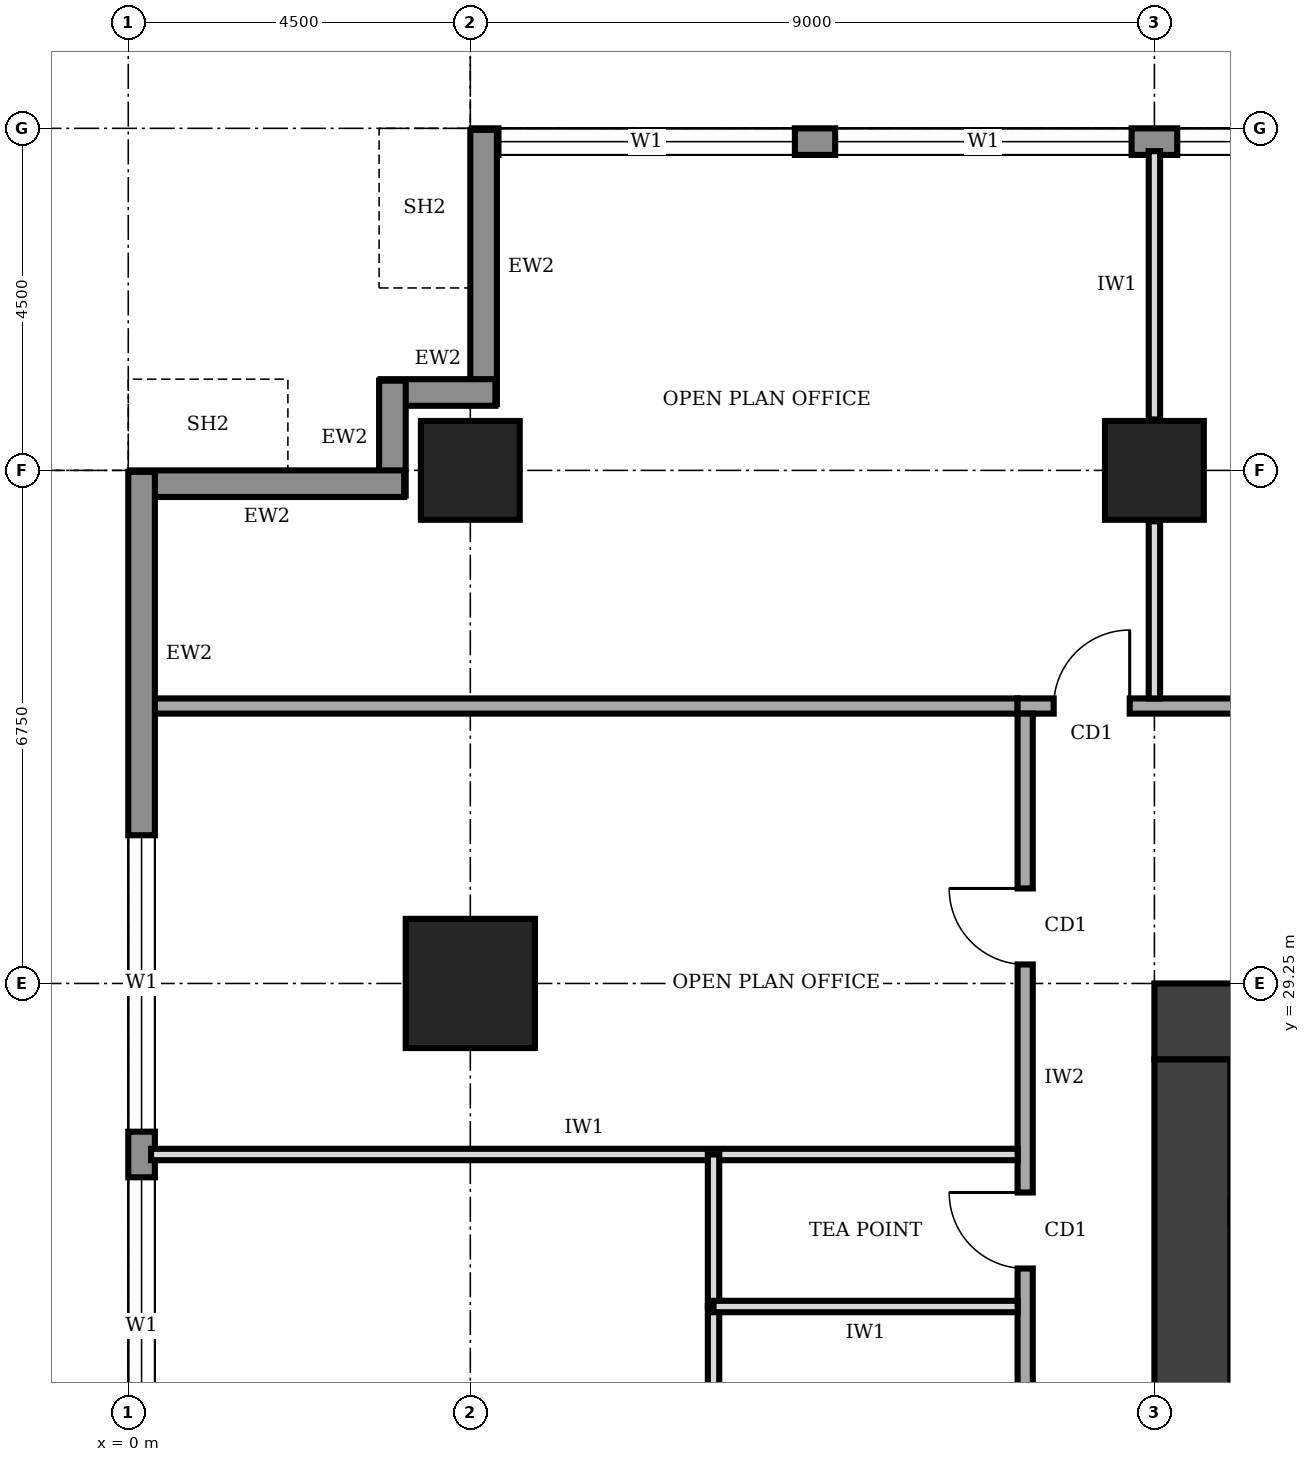
"""IFC4 building model, lengths in metres.
Left out: names, types, materials, properties, quantities, classifications, styles, units other than length and angle.
Written with IfcOpenShell. Run it as: python <this file> out.ifc"""

import sys

from ifc_helpers import new_model, si_unit, direction, frame, frame_2d, origin, origin_2d, place, context, subcontext, project, spatial, rectangle, extrude, element, fill, save


model = new_model("IFC4")
c1 = context("Model", 3, precision=1e-05, world=origin(), true_north=direction((0.0, 1.0)))
c2 = subcontext(c1, "Body", "Model", "MODEL_VIEW")
j1 = project(units=[si_unit("LENGTHUNIT", "METRE"), si_unit("PLANEANGLEUNIT", "RADIAN")], contexts=[c1])
p1 = place(None, origin())
s1 = spatial("IfcSite", under=j1, at=p1, CompositionType="ELEMENT")
p2 = place(p1, origin())
s2 = spatial("IfcBuilding", under=s1, at=p2, CompositionType="ELEMENT")
p3 = place(p2, frame((0.0, 0.0, 277.0)))
s3 = spatial("IfcBuildingStorey", under=s2, at=p3, CompositionType="ELEMENT", Elevation=277.0)
p4 = place(p3, frame((27.0, 28.75, 0.0), z_axis=(0.0, 0.0, 1.0), x_axis=(-1.0, 0.0, 0.0)))
e1 = element("IfcWall", 1, at=p4, inside=s3, PredefinedType="SHEAR", context=c2, shape_type="SweptSolid", body=[
    extrude(rectangle(XDim=13.5, YDim=1.0, at=frame_2d((6.75, 0.0))), origin(), (0.0, 0.0, 1.0), 4.0),
])
p5 = place(p4, frame((4.75, 0.0, 0.0)))
e2 = element("IfcOpeningElement", 2, at=p5, cuts=e1, PredefinedType="OPENING", context=c2, shape_type="SweptSolid", body=[
    extrude(rectangle(XDim=1.8, YDim=2.1, at=frame_2d((0.9, 1.05))), frame((0.0, 0.51, 0.0), z_axis=(0.0, -1.0, 0.0), x_axis=(1.0, 0.0, 0.0)), (0.0, 0.0, 1.0), 1.02),
])
p6 = place(p3, frame((14.0, 28.25, 0.0), z_axis=(0.0, 0.0, 1.0), x_axis=(0.0, -1.0, 0.0)))
e3 = element("IfcWall", 3, at=p6, inside=s3, PredefinedType="SHEAR", context=c2, shape_type="SweptSolid", body=[
    extrude(rectangle(XDim=16.0, YDim=1.0, at=frame_2d((8.0, 0.0))), origin(), (0.0, 0.0, 1.0), 4.0),
])
p7 = place(p3, frame((4.5, 29.25, 0.0), z_axis=(0.0, 0.0, 1.0), x_axis=(1.0, 0.0, 0.0)))
e4 = element("IfcColumn", 4, at=p7, inside=s3, PredefinedType="COLUMN", context=c2, shape_type="SweptSolid", body=[
    extrude(rectangle(XDim=1.7, YDim=1.7, at=origin_2d()), origin(), (0.0, 0.0, 1.0), 4.0),
])
for number, where, z_axis, x_axis in (
    (5, (4.5, 36.0, 0.0), (0.0, 0.0, 1.0), (1.0, 0.0, 0.0)),
    (6, (13.5, 36.0, 0.0), (0.0, 0.0, 1.0), (1.0, 0.0, 0.0)),
):
    element("IfcColumn", number, at=place(p3, frame(where, z_axis=z_axis, x_axis=x_axis)), inside=s3, PredefinedType="COLUMN", context=c2, shape_type="SweptSolid", body=[
        extrude(rectangle(XDim=1.3, YDim=1.3, at=origin_2d()), origin(), (0.0, 0.0, 1.0), 4.0),
    ])
p8 = place(p3, frame((35.98, 40.325, 0.0), z_axis=(0.0, 0.0, 1.0), x_axis=(-1.0, 0.0, 0.0)))
e7 = element("IfcWall", 7, at=p8, inside=s3, PredefinedType="STANDARD", context=c2, shape_type="SweptSolid", body=[
    extrude(rectangle(XDim=31.46, YDim=0.35, at=frame_2d((15.73, 0.0))), origin(), (0.0, 0.0, 1.0), 3.75),
])
p9 = place(p8, frame((27.21, 0.0, 0.9)))
e8 = element("IfcOpeningElement", 8, at=p9, cuts=e7, PredefinedType="OPENING", context=c2, shape_type="SweptSolid", body=[
    extrude(rectangle(XDim=3.9, YDim=2.2, at=frame_2d((1.95, 1.1))), frame((0.0, 0.185, 0.0), z_axis=(0.0, -1.0, 0.0), x_axis=(1.0, 0.0, 0.0)), (0.0, 0.0, 1.0), 0.37),
])
p10 = place(p8, frame((22.78, 0.0, 0.9)))
e9 = element("IfcOpeningElement", 9, at=p10, cuts=e7, PredefinedType="OPENING", context=c2, shape_type="SweptSolid", body=[
    extrude(rectangle(XDim=3.9, YDim=2.2, at=frame_2d((1.95, 1.1))), frame((0.0, 0.185, 0.0), z_axis=(0.0, -1.0, 0.0), x_axis=(1.0, 0.0, 0.0)), (0.0, 0.0, 1.0), 0.37),
])
p11 = place(p8, frame((18.28, 0.0, 0.9)))
e10 = element("IfcOpeningElement", 10, at=p11, cuts=e7, PredefinedType="OPENING", context=c2, shape_type="SweptSolid", body=[
    extrude(rectangle(XDim=3.9, YDim=2.2, at=frame_2d((1.95, 1.1))), frame((0.0, 0.185, 0.0), z_axis=(0.0, -1.0, 0.0), x_axis=(1.0, 0.0, 0.0)), (0.0, 0.0, 1.0), 0.37),
])
p12 = place(p8, frame((13.78, 0.0, 0.9)))
e11 = element("IfcOpeningElement", 11, at=p12, cuts=e7, PredefinedType="OPENING", context=c2, shape_type="SweptSolid", body=[
    extrude(rectangle(XDim=3.9, YDim=2.2, at=frame_2d((1.95, 1.1))), frame((0.0, 0.185, 0.0), z_axis=(0.0, -1.0, 0.0), x_axis=(1.0, 0.0, 0.0)), (0.0, 0.0, 1.0), 0.37),
])
p13 = place(p8, frame((9.28, 0.0, 0.9)))
e12 = element("IfcOpeningElement", 12, at=p13, cuts=e7, PredefinedType="OPENING", context=c2, shape_type="SweptSolid", body=[
    extrude(rectangle(XDim=3.9, YDim=2.2, at=frame_2d((1.95, 1.1))), frame((0.0, 0.185, 0.0), z_axis=(0.0, -1.0, 0.0), x_axis=(1.0, 0.0, 0.0)), (0.0, 0.0, 1.0), 0.37),
])
p14 = place(p8, frame((4.78, 0.0, 0.9)))
e13 = element("IfcOpeningElement", 13, at=p14, cuts=e7, PredefinedType="OPENING", context=c2, shape_type="SweptSolid", body=[
    extrude(rectangle(XDim=3.9, YDim=2.2, at=frame_2d((1.95, 1.1))), frame((0.0, 0.185, 0.0), z_axis=(0.0, -1.0, 0.0), x_axis=(1.0, 0.0, 0.0)), (0.0, 0.0, 1.0), 0.37),
])
p15 = place(p3, frame((4.675, 40.48, 0.0), z_axis=(0.0, 0.0, 1.0), x_axis=(0.0, -1.0, 0.0)))
e14 = element("IfcWall", 14, at=p15, inside=s3, PredefinedType="STANDARD", context=c2, shape_type="SweptSolid", body=[
    extrude(rectangle(XDim=3.61, YDim=0.35, at=frame_2d((1.805, 0.0))), origin(), (0.0, 0.0, 1.0), 2.85),
])
for number, where, z_axis, x_axis in (
    (15, (4.83, 37.025, 0.0), (0.0, 0.0, 1.0), (-1.0, 0.0, 0.0)),
    (16, (3.475, 37.18, 0.0), (0.0, 0.0, 1.0), (0.0, -1.0, 0.0)),
):
    element("IfcWall", number, at=place(p3, frame(where, z_axis=z_axis, x_axis=x_axis)), inside=s3, PredefinedType="STANDARD", context=c2, shape_type="SweptSolid", body=[
        extrude(rectangle(XDim=1.51, YDim=0.35, at=frame_2d((0.755, 0.0))), origin(), (0.0, 0.0, 1.0), 3.75),
    ])
p16 = place(p3, frame((3.63, 35.825, 0.0), z_axis=(0.0, 0.0, 1.0), x_axis=(-1.0, 0.0, 0.0)))
e17 = element("IfcWall", 17, at=p16, inside=s3, PredefinedType="STANDARD", context=c2, shape_type="SweptSolid", body=[
    extrude(rectangle(XDim=3.61, YDim=0.35, at=frame_2d((1.805, 0.0))), origin(), (0.0, 0.0, 1.0), 2.85),
])
p17 = place(p3, frame((0.175, 35.98, 0.0), z_axis=(0.0, 0.0, 1.0), x_axis=(0.0, -1.0, 0.0)))
e18 = element("IfcWall", 18, at=p17, inside=s3, PredefinedType="STANDARD", context=c2, shape_type="SweptSolid", body=[
    extrude(rectangle(XDim=31.46, YDim=0.35, at=frame_2d((15.73, 0.0))), origin(), (0.0, 0.0, 1.0), 3.75),
])
p18 = place(p17, frame((27.21, 0.0, 0.9)))
e19 = element("IfcOpeningElement", 19, at=p18, cuts=e18, PredefinedType="OPENING", context=c2, shape_type="SweptSolid", body=[
    extrude(rectangle(XDim=3.9, YDim=2.2, at=frame_2d((1.95, 1.1))), frame((0.0, 0.185, 0.0), z_axis=(0.0, -1.0, 0.0), x_axis=(1.0, 0.0, 0.0)), (0.0, 0.0, 1.0), 0.37),
])
p19 = place(p17, frame((22.78, 0.0, 0.9)))
e20 = element("IfcOpeningElement", 20, at=p19, cuts=e18, PredefinedType="OPENING", context=c2, shape_type="SweptSolid", body=[
    extrude(rectangle(XDim=3.9, YDim=2.2, at=frame_2d((1.95, 1.1))), frame((0.0, 0.185, 0.0), z_axis=(0.0, -1.0, 0.0), x_axis=(1.0, 0.0, 0.0)), (0.0, 0.0, 1.0), 0.37),
])
p20 = place(p17, frame((18.28, 0.0, 0.9)))
e21 = element("IfcOpeningElement", 21, at=p20, cuts=e18, PredefinedType="OPENING", context=c2, shape_type="SweptSolid", body=[
    extrude(rectangle(XDim=3.9, YDim=2.2, at=frame_2d((1.95, 1.1))), frame((0.0, 0.185, 0.0), z_axis=(0.0, -1.0, 0.0), x_axis=(1.0, 0.0, 0.0)), (0.0, 0.0, 1.0), 0.37),
])
p21 = place(p17, frame((13.78, 0.0, 0.9)))
e22 = element("IfcOpeningElement", 22, at=p21, cuts=e18, PredefinedType="OPENING", context=c2, shape_type="SweptSolid", body=[
    extrude(rectangle(XDim=3.9, YDim=2.2, at=frame_2d((1.95, 1.1))), frame((0.0, 0.185, 0.0), z_axis=(0.0, -1.0, 0.0), x_axis=(1.0, 0.0, 0.0)), (0.0, 0.0, 1.0), 0.37),
])
p22 = place(p17, frame((9.28, 0.0, 0.9)))
e23 = element("IfcOpeningElement", 23, at=p22, cuts=e18, PredefinedType="OPENING", context=c2, shape_type="SweptSolid", body=[
    extrude(rectangle(XDim=3.9, YDim=2.2, at=frame_2d((1.95, 1.1))), frame((0.0, 0.185, 0.0), z_axis=(0.0, -1.0, 0.0), x_axis=(1.0, 0.0, 0.0)), (0.0, 0.0, 1.0), 0.37),
])
p23 = place(p17, frame((4.78, 0.0, 0.9)))
e24 = element("IfcOpeningElement", 24, at=p23, cuts=e18, PredefinedType="OPENING", context=c2, shape_type="SweptSolid", body=[
    extrude(rectangle(XDim=3.9, YDim=2.2, at=frame_2d((1.95, 1.1))), frame((0.0, 0.185, 0.0), z_axis=(0.0, -1.0, 0.0), x_axis=(1.0, 0.0, 0.0)), (0.0, 0.0, 1.0), 0.37),
])
p24 = place(p3, frame((28.6, 32.9, 0.0), z_axis=(0.0, 0.0, 1.0), x_axis=(-1.0, 0.0, 0.0)))
e25 = element("IfcWall", 25, at=p24, inside=s3, PredefinedType="SOLIDWALL", context=c2, shape_type="SweptSolid", body=[
    extrude(rectangle(XDim=16.9, YDim=0.2, at=frame_2d((8.45, 0.0))), origin(), (0.0, 0.0, 1.0), 3.75),
])
p25 = place(p24, frame((15.425, 0.0, 0.0)))
e26 = element("IfcOpeningElement", 26, at=p25, cuts=e25, PredefinedType="OPENING", context=c2, shape_type="SweptSolid", body=[
    extrude(rectangle(XDim=1.0, YDim=2.1, at=frame_2d((0.5, 1.05))), frame((0.0, 0.11, 0.0), z_axis=(0.0, -1.0, 0.0), x_axis=(1.0, 0.0, 0.0)), (0.0, 0.0, 1.0), 0.22),
])
p26 = place(p24, frame((7.45, 0.0, 0.0)))
e27 = element("IfcOpeningElement", 27, at=p26, cuts=e25, PredefinedType="OPENING", context=c2, shape_type="SweptSolid", body=[
    extrude(rectangle(XDim=1.8, YDim=2.1, at=frame_2d((0.9, 1.05))), frame((0.0, 0.11, 0.0), z_axis=(0.0, -1.0, 0.0), x_axis=(1.0, 0.0, 0.0)), (0.0, 0.0, 1.0), 0.22),
])
p27 = place(p24, frame((0.275, 0.0, 0.0)))
e28 = element("IfcOpeningElement", 28, at=p27, cuts=e25, PredefinedType="OPENING", context=c2, shape_type="SweptSolid", body=[
    extrude(rectangle(XDim=1.0, YDim=2.1, at=frame_2d((0.5, 1.05))), frame((0.0, 0.11, 0.0), z_axis=(0.0, -1.0, 0.0), x_axis=(1.0, 0.0, 0.0)), (0.0, 0.0, 1.0), 0.22),
])
p28 = place(p3, frame((11.8, 32.8, 0.0), z_axis=(0.0, 0.0, 1.0), x_axis=(0.0, -1.0, 0.0)))
e29 = element("IfcWall", 29, at=p28, inside=s3, PredefinedType="SOLIDWALL", context=c2, shape_type="SweptSolid", body=[
    extrude(rectangle(XDim=23.8, YDim=0.2, at=frame_2d((11.9, 0.0))), origin(), (0.0, 0.0, 1.0), 3.75),
])
p29 = place(p28, frame((21.05, 0.0, 0.0)))
e30 = element("IfcOpeningElement", 30, at=p29, cuts=e29, PredefinedType="OPENING", context=c2, shape_type="SweptSolid", body=[
    extrude(rectangle(XDim=1.0, YDim=2.1, at=frame_2d((0.5, 1.05))), frame((0.0, 0.11, 0.0), z_axis=(0.0, -1.0, 0.0), x_axis=(1.0, 0.0, 0.0)), (0.0, 0.0, 1.0), 0.22),
])
p30 = place(p28, frame((17.65, 0.0, 0.0)))
e31 = element("IfcOpeningElement", 31, at=p30, cuts=e29, PredefinedType="OPENING", context=c2, shape_type="SweptSolid", body=[
    extrude(rectangle(XDim=0.9, YDim=2.1, at=frame_2d((0.45, 1.05))), frame((0.0, 0.11, 0.0), z_axis=(0.0, -1.0, 0.0), x_axis=(1.0, 0.0, 0.0)), (0.0, 0.0, 1.0), 0.22),
])
p31 = place(p28, frame((14.45, 0.0, 0.0)))
e32 = element("IfcOpeningElement", 32, at=p31, cuts=e29, PredefinedType="OPENING", context=c2, shape_type="SweptSolid", body=[
    extrude(rectangle(XDim=0.9, YDim=2.1, at=frame_2d((0.45, 1.05))), frame((0.0, 0.11, 0.0), z_axis=(0.0, -1.0, 0.0), x_axis=(1.0, 0.0, 0.0)), (0.0, 0.0, 1.0), 0.22),
])
p32 = place(p28, frame((8.9, 0.0, 0.0)))
e33 = element("IfcOpeningElement", 33, at=p32, cuts=e29, PredefinedType="OPENING", context=c2, shape_type="SweptSolid", body=[
    extrude(rectangle(XDim=0.9, YDim=2.1, at=frame_2d((0.45, 1.05))), frame((0.0, 0.11, 0.0), z_axis=(0.0, -1.0, 0.0), x_axis=(1.0, 0.0, 0.0)), (0.0, 0.0, 1.0), 0.22),
])
p33 = place(p28, frame((6.3, 0.0, 0.0)))
e34 = element("IfcOpeningElement", 34, at=p33, cuts=e29, PredefinedType="OPENING", context=c2, shape_type="SweptSolid", body=[
    extrude(rectangle(XDim=1.0, YDim=2.1, at=frame_2d((0.5, 1.05))), frame((0.0, 0.11, 0.0), z_axis=(0.0, -1.0, 0.0), x_axis=(1.0, 0.0, 0.0)), (0.0, 0.0, 1.0), 0.22),
])
p34 = place(p28, frame((11.4, 0.0, 0.0)))
e35 = element("IfcOpeningElement", 35, at=p34, cuts=e29, PredefinedType="OPENING", context=c2, shape_type="SweptSolid", body=[
    extrude(rectangle(XDim=1.0, YDim=2.1, at=frame_2d((0.5, 1.05))), frame((0.0, 0.11, 0.0), z_axis=(0.0, -1.0, 0.0), x_axis=(1.0, 0.0, 0.0)), (0.0, 0.0, 1.0), 0.22),
])
p35 = place(p28, frame((2.3, 0.0, 0.0)))
e36 = element("IfcOpeningElement", 36, at=p35, cuts=e29, PredefinedType="OPENING", context=c2, shape_type="SweptSolid", body=[
    extrude(rectangle(XDim=1.0, YDim=2.1, at=frame_2d((0.5, 1.05))), frame((0.0, 0.11, 0.0), z_axis=(0.0, -1.0, 0.0), x_axis=(1.0, 0.0, 0.0)), (0.0, 0.0, 1.0), 0.22),
])
p36 = place(p3, frame((0.3, 32.9, 0.0), z_axis=(0.0, 0.0, 1.0), x_axis=(1.0, 0.0, 0.0)))
e37 = element("IfcWall", 37, at=p36, inside=s3, PredefinedType="SOLIDWALL", context=c2, shape_type="SweptSolid", body=[
    extrude(rectangle(XDim=11.4, YDim=0.2, at=frame_2d((5.7, 0.0))), origin(), (0.0, 0.0, 1.0), 3.75),
])
p37 = place(p3, frame((13.5, 33.0, 0.0), z_axis=(0.0, 0.0, 1.0), x_axis=(0.0, 1.0, 0.0)))
e38 = element("IfcWall", 38, at=p37, inside=s3, PredefinedType="PARTITIONING", context=c2, shape_type="SweptSolid", body=[
    extrude(rectangle(XDim=2.33, YDim=0.15, at=frame_2d((1.165, 0.0))), origin(), (0.0, 0.0, 1.0), 2.85),
])
p38 = place(p3, frame((13.5, 36.67, 0.0), z_axis=(0.0, 0.0, 1.0), x_axis=(0.0, 1.0, 0.0)))
e39 = element("IfcWall", 39, at=p38, inside=s3, PredefinedType="PARTITIONING", context=c2, shape_type="SweptSolid", body=[
    extrude(rectangle(XDim=3.53, YDim=0.15, at=frame_2d((1.765, 0.0))), origin(), (0.0, 0.0, 1.0), 2.85),
])
p39 = place(p3, frame((0.3, 27.0, 0.0), z_axis=(0.0, 0.0, 1.0), x_axis=(1.0, 0.0, 0.0)))
e40 = element("IfcWall", 40, at=p39, inside=s3, PredefinedType="PARTITIONING", context=c2, shape_type="SweptSolid", body=[
    extrude(rectangle(XDim=11.4, YDim=0.15, at=frame_2d((5.7, 0.0))), origin(), (0.0, 0.0, 1.0), 3.75),
])
p40 = place(p3, frame((11.7, 25.0, 0.0), z_axis=(0.0, 0.0, 1.0), x_axis=(-1.0, 0.0, 0.0)))
e41 = element("IfcWall", 41, at=p40, inside=s3, PredefinedType="PARTITIONING", context=c2, shape_type="SweptSolid", body=[
    extrude(rectangle(XDim=4.0, YDim=0.15, at=frame_2d((2.0, 0.0))), origin(), (0.0, 0.0, 1.0), 3.75),
])
p41 = place(p3, frame((7.7, 21.9, 0.0), z_axis=(0.0, 0.0, 1.0), x_axis=(0.0, 1.0, 0.0)))
e42 = element("IfcWall", 42, at=p41, inside=s3, PredefinedType="PARTITIONING", context=c2, shape_type="SweptSolid", body=[
    extrude(rectangle(XDim=3.1, YDim=0.15, at=frame_2d((1.55, 0.0))), origin(), (0.0, 0.0, 1.0), 3.75),
])
p42 = place(p3, frame((7.7, 25.0, 0.0), z_axis=(0.0, 0.0, 1.0), x_axis=(0.0, 1.0, 0.0)))
e43 = element("IfcWall", 43, at=p42, inside=s3, PredefinedType="PARTITIONING", context=c2, shape_type="SweptSolid", body=[
    extrude(rectangle(XDim=2.0, YDim=0.15, at=frame_2d((1.0, 0.0))), origin(), (0.0, 0.0, 1.0), 3.75),
])
p43 = place(p9, origin())
e44 = element("IfcWindow", 44, at=p43, inside=s3, PartitioningType="SINGLE_PANEL", PredefinedType="WINDOW", context=c2, shape_type="SweptSolid", body=[
    extrude(rectangle(XDim=3.9, YDim=2.2, at=frame_2d((1.95, 1.1))), frame((0.0, 0.03, 0.0), z_axis=(0.0, -1.0, 0.0), x_axis=(1.0, 0.0, 0.0)), (0.0, 0.0, 1.0), 0.06),
])
fill(e8, e44)
p44 = place(p10, origin())
e45 = element("IfcWindow", 45, at=p44, inside=s3, PartitioningType="SINGLE_PANEL", PredefinedType="WINDOW", context=c2, shape_type="SweptSolid", body=[
    extrude(rectangle(XDim=3.9, YDim=2.2, at=frame_2d((1.95, 1.1))), frame((0.0, 0.03, 0.0), z_axis=(0.0, -1.0, 0.0), x_axis=(1.0, 0.0, 0.0)), (0.0, 0.0, 1.0), 0.06),
])
fill(e9, e45)
p45 = place(p11, origin())
e46 = element("IfcWindow", 46, at=p45, inside=s3, PartitioningType="SINGLE_PANEL", PredefinedType="WINDOW", context=c2, shape_type="SweptSolid", body=[
    extrude(rectangle(XDim=3.9, YDim=2.2, at=frame_2d((1.95, 1.1))), frame((0.0, 0.03, 0.0), z_axis=(0.0, -1.0, 0.0), x_axis=(1.0, 0.0, 0.0)), (0.0, 0.0, 1.0), 0.06),
])
fill(e10, e46)
p46 = place(p22, origin())
e47 = element("IfcWindow", 47, at=p46, inside=s3, PartitioningType="SINGLE_PANEL", PredefinedType="WINDOW", context=c2, shape_type="SweptSolid", body=[
    extrude(rectangle(XDim=3.9, YDim=2.2, at=frame_2d((1.95, 1.1))), frame((0.0, 0.03, 0.0), z_axis=(0.0, -1.0, 0.0), x_axis=(1.0, 0.0, 0.0)), (0.0, 0.0, 1.0), 0.06),
])
fill(e23, e47)
p47 = place(p23, origin())
e48 = element("IfcWindow", 48, at=p47, inside=s3, PartitioningType="SINGLE_PANEL", PredefinedType="WINDOW", context=c2, shape_type="SweptSolid", body=[
    extrude(rectangle(XDim=3.9, YDim=2.2, at=frame_2d((1.95, 1.1))), frame((0.0, 0.03, 0.0), z_axis=(0.0, -1.0, 0.0), x_axis=(1.0, 0.0, 0.0)), (0.0, 0.0, 1.0), 0.06),
])
fill(e24, e48)
p48 = place(p25, frame((1.0, 0.0, 0.0), z_axis=(0.0, 0.0, 1.0), x_axis=(-1.0, 0.0, 0.0)))
e49 = element("IfcDoor", 49, at=p48, inside=s3, OperationType="SINGLE_SWING_RIGHT", PredefinedType="DOOR", context=c2, shape_type="SweptSolid", body=[
    extrude(rectangle(XDim=1.0, YDim=2.1, at=frame_2d((0.5, 1.05))), frame((0.0, 0.025, 0.0), z_axis=(0.0, -1.0, 0.0), x_axis=(1.0, 0.0, 0.0)), (0.0, 0.0, 1.0), 0.05),
])
fill(e26, e49)
p49 = place(p33, frame((1.0, 0.0, 0.0), z_axis=(0.0, 0.0, 1.0), x_axis=(-1.0, 0.0, 0.0)))
e50 = element("IfcDoor", 50, at=p49, inside=s3, OperationType="SINGLE_SWING_RIGHT", PredefinedType="DOOR", context=c2, shape_type="SweptSolid", body=[
    extrude(rectangle(XDim=1.0, YDim=2.1, at=frame_2d((0.5, 1.05))), frame((0.0, 0.025, 0.0), z_axis=(0.0, -1.0, 0.0), x_axis=(1.0, 0.0, 0.0)), (0.0, 0.0, 1.0), 0.05),
])
fill(e34, e50)
p50 = place(p35, frame((1.0, 0.0, 0.0), z_axis=(0.0, 0.0, 1.0), x_axis=(-1.0, 0.0, 0.0)))
e51 = element("IfcDoor", 51, at=p50, inside=s3, OperationType="SINGLE_SWING_RIGHT", PredefinedType="DOOR", context=c2, shape_type="SweptSolid", body=[
    extrude(rectangle(XDim=1.0, YDim=2.1, at=frame_2d((0.5, 1.05))), frame((0.0, 0.025, 0.0), z_axis=(0.0, -1.0, 0.0), x_axis=(1.0, 0.0, 0.0)), (0.0, 0.0, 1.0), 0.05),
])
fill(e36, e51)
save(model, sys.argv[1])
